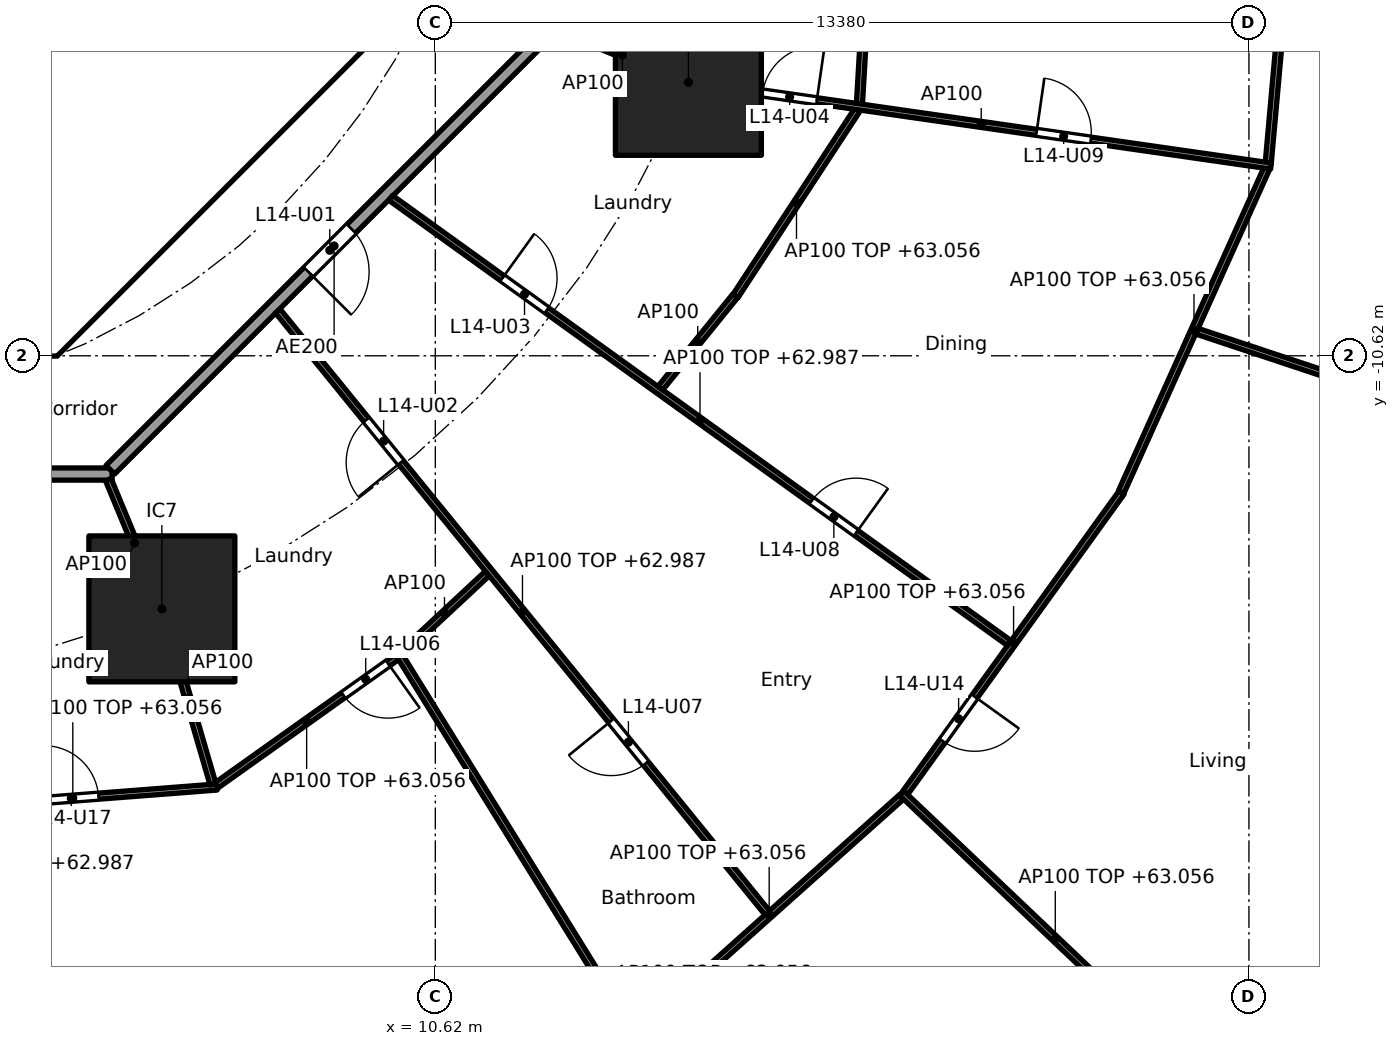
"""IFC4 building model, lengths in metres.
Left out: names, types, materials, properties, quantities, classifications, styles, units other than length and angle.
Written with IfcOpenShell. Run it as: python <this file> out.ifc"""

import sys

from ifc_helpers import new_model, si_unit, direction, frame, frame_2d, origin, origin_2d, place, context, subcontext, project, spatial, polyline, rectangle, outline, extrude, element, fill, save


model = new_model("IFC4")
c1 = context("Model", 3, precision=1e-05, world=origin(), true_north=direction((0.0, 1.0)))
c2 = subcontext(c1, "Body", "Model", "MODEL_VIEW")
j1 = project(units=[si_unit("LENGTHUNIT", "METRE"), si_unit("PLANEANGLEUNIT", "RADIAN")], contexts=[c1])
p1 = place(None, origin())
s1 = spatial("IfcSite", under=j1, at=p1, CompositionType="ELEMENT")
p2 = place(p1, origin())
s2 = spatial("IfcBuilding", under=s1, at=p2, CompositionType="ELEMENT")
p3 = place(p2, frame((0.0, 0.0, 60.3)))
s3 = spatial("IfcBuildingStorey", under=s2, at=p3, CompositionType="ELEMENT", Elevation=60.3)
for number, where, z_axis, x_axis in (
    (1, (6.123, -14.782, 0.0), (0.0, 0.0, 1.0), (1.0, 0.0, 0.0)),
    (2, (14.782, -6.123, 0.0), (0.0, 0.0, 1.0), (1.0, 0.0, 0.0)),
):
    element("IfcColumn", number, at=place(p3, frame(where, z_axis=z_axis, x_axis=x_axis)), inside=s3, PredefinedType="COLUMN", context=c2, shape_type="SweptSolid", body=[
        extrude(rectangle(XDim=2.4, YDim=2.4, at=origin_2d()), origin(), (0.0, 0.0, 1.0), 3.7),
    ])
p4 = place(p3, frame((4.613, -9.988, 0.0), z_axis=(0.0, 0.0, 1.0), x_axis=(0.707106781187, 0.707106781187, 0.0)))
e3 = element("IfcWall", 3, at=p4, inside=s3, PredefinedType="SHEAR", context=c2, shape_type="SweptSolid", body=[
    extrude(rectangle(XDim=7.602, YDim=0.6, at=frame_2d((3.801, 0.0))), origin(), (0.0, 0.0, 1.0), 3.44),
])
p5 = place(p4, frame((3.201, 0.0, 0.0)))
e4 = element("IfcOpeningElement", 4, at=p5, cuts=e3, PredefinedType="OPENING", context=c2, shape_type="SweptSolid", body=[
    extrude(rectangle(XDim=1.2, YDim=2.1, at=frame_2d((0.6, 1.05))), frame((0.0, 0.31, 0.0), z_axis=(0.0, -1.0, 0.0), x_axis=(1.0, 0.0, 0.0)), (0.0, 0.0, 1.0), 0.62),
])
p6 = place(p3, origin())
e5 = element("IfcWall", 5, at=p6, inside=s3, PredefinedType="SHEAR", context=c2, shape_type="SweptSolid", body=[
    extrude(outline(polyline([(-4.152, -10.025), (4.152, -10.025), (4.401, -9.776), (4.825, -10.2), (4.401, -10.625), (-4.401, -10.625), (-4.825, -10.2), (-4.401, -9.776), (-4.152, -10.025)])), origin(), (0.0, 0.0, 1.0), 3.44),
])
p7 = place(p3, frame((-5.104, -12.565, 0.0), z_axis=(0.0, 0.0, 1.0), x_axis=(1.0, 0.0, 0.0)))
e6 = element("IfcWall", 6, at=p7, inside=s3, PredefinedType="PARTITIONING", context=c2, shape_type="SweptSolid", body=[
    extrude(rectangle(XDim=10.409, YDim=0.2, at=frame_2d((5.205, 0.0))), origin(), (0.0, 0.0, 1.0), 3.44),
])
p8 = place(p3, frame((5.275, -12.494, 0.0), z_axis=(0.0, 0.0, 1.0), x_axis=(0.707106781187, 0.707106781187, 0.0)))
e7 = element("IfcWall", 7, at=p8, inside=s3, PredefinedType="PARTITIONING", context=c2, shape_type="SweptSolid", body=[
    extrude(rectangle(XDim=10.409, YDim=0.2, at=frame_2d((5.205, 0.0))), origin(), (0.0, 0.0, 1.0), 3.44),
])
p9 = place(p8, frame((4.604, 0.0, 0.0)))
e8 = element("IfcOpeningElement", 8, at=p9, cuts=e7, PredefinedType="OPENING", context=c2, shape_type="SweptSolid", body=[
    extrude(rectangle(XDim=1.0, YDim=2.1, at=frame_2d((0.5, 1.05))), frame((0.0, 0.11, 0.0), z_axis=(0.0, -1.0, 0.0), x_axis=(1.0, 0.0, 0.0)), (0.0, 0.0, 1.0), 0.22),
])
p10 = place(p3, frame((17.971, -0.05, 0.0), z_axis=(0.0, 0.0, 1.0), x_axis=(-0.058475267553, -0.998288857538, 0.0)))
e9 = element("IfcWall", 9, at=p10, inside=s3, PredefinedType="PARTITIONING", context=c2, shape_type="SweptSolid", body=[
    extrude(rectangle(XDim=6.438, YDim=0.1, at=frame_2d((3.219, 0.0))), origin(), (0.0, 0.0, 1.0), 2.756),
])
p11 = place(p3, frame((24.982, -0.05, 0.0), z_axis=(0.0, 0.0, 1.0), x_axis=(-0.089432471274, -0.995992888068, 0.0)))
e10 = element("IfcWall", 10, at=p11, inside=s3, PredefinedType="PARTITIONING", context=c2, shape_type="SweptSolid", body=[
    extrude(rectangle(XDim=7.423, YDim=0.1, at=frame_2d((3.711, 0.0))), origin(), (0.0, 0.0, 1.0), 2.756),
])
p12 = place(p3, frame((2.288, -18.078, 0.0), z_axis=(0.0, 0.0, 1.0), x_axis=(0.997016297228, 0.077191340583, 0.0)))
e11 = element("IfcWall", 11, at=p12, inside=s3, PredefinedType="PARTITIONING", context=c2, shape_type="SweptSolid", body=[
    extrude(rectangle(XDim=4.754, YDim=0.1, at=frame_2d((2.377, 0.0))), origin(), (0.0, 0.0, 1.0), 2.756),
])
p13 = place(p12, frame((1.902, 0.0, 0.0)))
e12 = element("IfcOpeningElement", 12, at=p13, cuts=e11, PredefinedType="OPENING", context=c2, shape_type="SweptSolid", body=[
    extrude(rectangle(XDim=0.9, YDim=2.1, at=frame_2d((0.45, 1.05))), frame((0.0, 0.06, 0.0), z_axis=(0.0, -1.0, 0.0), x_axis=(1.0, 0.0, 0.0)), (0.0, 0.0, 1.0), 0.12),
])
p14 = place(p3, frame((5.243, -12.657, 0.0), z_axis=(0.0, 0.0, 1.0), x_axis=(0.382719158442, -0.923864733477, 0.0)))
e13 = element("IfcWall", 13, at=p14, inside=s3, PredefinedType="PARTITIONING", context=c2, shape_type="SweptSolid", body=[
    extrude(rectangle(XDim=2.25, YDim=0.1, at=frame_2d((1.125, 0.0))), origin(), (0.0, 0.0, 1.0), 3.44),
])
p15 = place(p3, frame((6.137, -14.83, 0.0), z_axis=(0.0, 0.0, 1.0), x_axis=(0.279888967793, -0.960032377427, 0.0)))
e14 = element("IfcWall", 14, at=p15, inside=s3, PredefinedType="PARTITIONING", context=c2, shape_type="SweptSolid", body=[
    extrude(rectangle(XDim=2.955, YDim=0.1, at=frame_2d((1.478, 0.0))), origin(), (0.0, 0.0, 1.0), 3.44),
])
p16 = place(p3, frame((7.019, -17.686, 0.0), z_axis=(0.0, 0.0, 1.0), x_axis=(0.81494477814, 0.57953861699, 0.0)))
e15 = element("IfcWall", 15, at=p16, inside=s3, PredefinedType="PARTITIONING", context=c2, shape_type="SweptSolid", body=[
    extrude(rectangle(XDim=3.644, YDim=0.1, at=frame_2d((1.822, 0.0))), origin(), (0.0, 0.0, 1.0), 2.756),
])
p17 = place(p16, frame((2.564, 0.0, 0.0)))
e16 = element("IfcOpeningElement", 16, at=p17, cuts=e15, PredefinedType="OPENING", context=c2, shape_type="SweptSolid", body=[
    extrude(rectangle(XDim=0.9, YDim=2.1, at=frame_2d((0.45, 1.05))), frame((0.0, 0.06, 0.0), z_axis=(0.0, -1.0, 0.0), x_axis=(1.0, 0.0, 0.0)), (0.0, 0.0, 1.0), 0.12),
])
p18 = place(p3, frame((10.003, -15.503, 0.0), z_axis=(0.0, 0.0, 1.0), x_axis=(0.526446106164, -0.850208502254, 0.0)))
e17 = element("IfcWall", 17, at=p18, inside=s3, PredefinedType="PARTITIONING", context=c2, shape_type="SweptSolid", body=[
    extrude(rectangle(XDim=14.33, YDim=0.1, at=frame_2d((7.165, 0.0))), origin(), (0.0, 0.0, 1.0), 2.756),
])
p19 = place(p18, frame((10.415, 0.0, 0.0)))
e18 = element("IfcOpeningElement", 18, at=p19, cuts=e17, PredefinedType="OPENING", context=c2, shape_type="SweptSolid", body=[
    extrude(rectangle(XDim=0.9, YDim=2.1, at=frame_2d((0.45, 1.05))), frame((0.0, 0.06, 0.0), z_axis=(0.0, -1.0, 0.0), x_axis=(1.0, 0.0, 0.0)), (0.0, 0.0, 1.0), 0.12),
])
p20 = place(p3, frame((10.066, -15.511, 0.0), z_axis=(0.0, 0.0, 1.0), x_axis=(0.73201609945, 0.681287333029, 0.0)))
e19 = element("IfcWall", 19, at=p20, inside=s3, PredefinedType="PARTITIONING", context=c2, shape_type="SweptSolid", body=[
    extrude(rectangle(XDim=1.925, YDim=0.1, at=frame_2d((0.962, 0.0))), origin(), (0.0, 0.0, 1.0), 3.44),
])
p21 = place(p3, frame((13.936, -21.761, 0.0), z_axis=(0.0, 0.0, 1.0), x_axis=(0.745806142791, 0.666163041136, 0.0)))
e20 = element("IfcWall", 20, at=p21, inside=s3, PredefinedType="PARTITIONING", context=c2, shape_type="SweptSolid", body=[
    extrude(rectangle(XDim=5.831, YDim=0.1, at=frame_2d((2.915, 0.0))), origin(), (0.0, 0.0, 1.0), 2.756),
])
p22 = place(p3, frame((8.028, -9.882, 0.0), z_axis=(0.0, 0.0, 1.0), x_axis=(0.631035554955, -0.77575390968, 0.0)))
e21 = element("IfcWall", 21, at=p22, inside=s3, PredefinedType="PARTITIONING", context=c2, shape_type="SweptSolid", body=[
    extrude(rectangle(XDim=12.759, YDim=0.1, at=frame_2d((6.379, 0.0))), origin(), (0.0, 0.0, 1.0), 2.687),
])
p23 = place(p22, frame((2.311, 0.0, 0.0)))
e22 = element("IfcOpeningElement", 22, at=p23, cuts=e21, PredefinedType="OPENING", context=c2, shape_type="SweptSolid", body=[
    extrude(rectangle(XDim=0.9, YDim=2.1, at=frame_2d((0.45, 1.05))), frame((0.0, 0.06, 0.0), z_axis=(0.0, -1.0, 0.0), x_axis=(1.0, 0.0, 0.0)), (0.0, 0.0, 1.0), 0.12),
])
p24 = place(p22, frame((8.69, 0.0, 0.0)))
e23 = element("IfcOpeningElement", 23, at=p24, cuts=e21, PredefinedType="OPENING", context=c2, shape_type="SweptSolid", body=[
    extrude(rectangle(XDim=0.9, YDim=2.1, at=frame_2d((0.45, 1.05))), frame((0.0, 0.06, 0.0), z_axis=(0.0, -1.0, 0.0), x_axis=(1.0, 0.0, 0.0)), (0.0, 0.0, 1.0), 0.12),
])
p25 = place(p3, frame((18.286, -17.809, 0.0), z_axis=(0.0, 0.0, 1.0), x_axis=(0.725242309581, -0.688493712676, 0.0)))
e24 = element("IfcWall", 24, at=p25, inside=s3, PredefinedType="PARTITIONING", context=c2, shape_type="SweptSolid", body=[
    extrude(rectangle(XDim=6.976, YDim=0.1, at=frame_2d((3.488, 0.0))), origin(), (0.0, 0.0, 1.0), 2.756),
])
p26 = place(p3, frame((18.351, -17.803, 0.0), z_axis=(0.0, 0.0, 1.0), x_axis=(0.584558392935, 0.811351640936, 0.0)))
e25 = element("IfcWall", 25, at=p26, inside=s3, PredefinedType="PARTITIONING", context=c2, shape_type="SweptSolid", body=[
    extrude(rectangle(XDim=6.084, YDim=0.1, at=frame_2d((3.042, 0.0))), origin(), (0.0, 0.0, 1.0), 2.756),
])
p27 = place(p26, frame((1.046, 0.0, 0.0)))
e26 = element("IfcOpeningElement", 26, at=p27, cuts=e25, PredefinedType="OPENING", context=c2, shape_type="SweptSolid", body=[
    extrude(rectangle(XDim=0.9, YDim=2.1, at=frame_2d((0.45, 1.05))), frame((0.0, 0.06, 0.0), z_axis=(0.0, -1.0, 0.0), x_axis=(1.0, 0.0, 0.0)), (0.0, 0.0, 1.0), 0.12),
])
p28 = place(p3, frame((9.886, -8.023, 0.0), z_axis=(0.0, 0.0, 1.0), x_axis=(0.811615973871, -0.58419133078, 0.0)))
e27 = element("IfcWall", 27, at=p28, inside=s3, PredefinedType="PARTITIONING", context=c2, shape_type="SweptSolid", body=[
    extrude(rectangle(XDim=12.535, YDim=0.1, at=frame_2d((6.268, 0.0))), origin(), (0.0, 0.0, 1.0), 2.687),
])
p29 = place(p28, frame((2.262, 0.0, 0.0)))
e28 = element("IfcOpeningElement", 28, at=p29, cuts=e27, PredefinedType="OPENING", context=c2, shape_type="SweptSolid", body=[
    extrude(rectangle(XDim=0.9, YDim=2.1, at=frame_2d((0.45, 1.05))), frame((0.0, 0.06, 0.0), z_axis=(0.0, -1.0, 0.0), x_axis=(1.0, 0.0, 0.0)), (0.0, 0.0, 1.0), 0.12),
])
p30 = place(p28, frame((8.53, 0.0, 0.0)))
e29 = element("IfcOpeningElement", 29, at=p30, cuts=e27, PredefinedType="OPENING", context=c2, shape_type="SweptSolid", body=[
    extrude(rectangle(XDim=0.9, YDim=2.1, at=frame_2d((0.45, 1.05))), frame((0.0, 0.06, 0.0), z_axis=(0.0, -1.0, 0.0), x_axis=(1.0, 0.0, 0.0)), (0.0, 0.0, 1.0), 0.12),
])
p31 = place(p3, frame((14.32, -11.153, 0.0), z_axis=(0.0, 0.0, 1.0), x_axis=(0.63006076661, 0.776545832761, 0.0)))
e30 = element("IfcWall", 30, at=p31, inside=s3, PredefinedType="PARTITIONING", context=c2, shape_type="SweptSolid", body=[
    extrude(rectangle(XDim=1.953, YDim=0.1, at=frame_2d((0.977, 0.0))), origin(), (0.0, 0.0, 1.0), 3.44),
])
p32 = place(p3, frame((15.555, -9.639, 0.0), z_axis=(0.0, 0.0, 1.0), x_axis=(0.547618530423, 0.836728119007, 0.0)))
e31 = element("IfcWall", 31, at=p32, inside=s3, PredefinedType="PARTITIONING", context=c2, shape_type="SweptSolid", body=[
    extrude(rectangle(XDim=3.67, YDim=0.1, at=frame_2d((1.835, 0.0))), origin(), (0.0, 0.0, 1.0), 2.756),
])
p33 = place(p3, frame((21.899, -12.861, 0.0), z_axis=(0.0, 0.0, 1.0), x_axis=(0.410197710154, 0.911996622025, 0.0)))
e32 = element("IfcWall", 32, at=p33, inside=s3, PredefinedType="PARTITIONING", context=c2, shape_type="SweptSolid", body=[
    extrude(rectangle(XDim=5.837, YDim=0.1, at=frame_2d((2.918, 0.0))), origin(), (0.0, 0.0, 1.0), 2.756),
])
p34 = place(p3, frame((23.144, -10.216, 0.0), z_axis=(0.0, 0.0, 1.0), x_axis=(0.948811715359, -0.315842253027, 0.0)))
e33 = element("IfcWall", 33, at=p34, inside=s3, PredefinedType="PARTITIONING", context=c2, shape_type="SweptSolid", body=[
    extrude(rectangle(XDim=7.6, YDim=0.1, at=frame_2d((3.8, 0.0))), origin(), (0.0, 0.0, 1.0), 2.837),
])
p35 = place(p34, frame((3.35, 0.0, 0.0)))
e34 = element("IfcOpeningElement", 34, at=p35, cuts=e33, PredefinedType="OPENING", context=c2, shape_type="SweptSolid", body=[
    extrude(rectangle(XDim=0.9, YDim=2.1, at=frame_2d((0.45, 1.05))), frame((0.0, 0.06, 0.0), z_axis=(0.0, -1.0, 0.0), x_axis=(1.0, 0.0, 0.0)), (0.0, 0.0, 1.0), 0.12),
])
p36 = place(p3, frame((12.657, -5.243, 0.0), z_axis=(0.0, 0.0, 1.0), x_axis=(0.923864733477, -0.382719158442, 0.0)))
e35 = element("IfcWall", 35, at=p36, inside=s3, PredefinedType="PARTITIONING", context=c2, shape_type="SweptSolid", body=[
    extrude(rectangle(XDim=2.25, YDim=0.1, at=frame_2d((1.125, 0.0))), origin(), (0.0, 0.0, 1.0), 3.44),
])
p37 = place(p3, frame((14.832, -6.13, 0.0), z_axis=(0.0, 0.0, 1.0), x_axis=(0.989837122016, -0.142205737856, 0.0)))
e36 = element("IfcWall", 36, at=p37, inside=s3, PredefinedType="PARTITIONING", context=c2, shape_type="SweptSolid", body=[
    extrude(rectangle(XDim=9.63, YDim=0.1, at=frame_2d((4.815, 0.0))), origin(), (0.0, 0.0, 1.0), 3.44),
])
p38 = place(p37, frame((1.182, 0.0, 0.0)))
e37 = element("IfcOpeningElement", 37, at=p38, cuts=e36, PredefinedType="OPENING", context=c2, shape_type="SweptSolid", body=[
    extrude(rectangle(XDim=0.9, YDim=2.1, at=frame_2d((0.45, 1.05))), frame((0.0, 0.06, 0.0), z_axis=(0.0, -1.0, 0.0), x_axis=(1.0, 0.0, 0.0)), (0.0, 0.0, 1.0), 0.12),
])
p39 = place(p37, frame((5.734, 0.0, 0.0)))
e38 = element("IfcOpeningElement", 38, at=p39, cuts=e36, PredefinedType="OPENING", context=c2, shape_type="SweptSolid", body=[
    extrude(rectangle(XDim=0.9, YDim=2.1, at=frame_2d((0.45, 1.05))), frame((0.0, 0.06, 0.0), z_axis=(0.0, -1.0, 0.0), x_axis=(1.0, 0.0, 0.0)), (0.0, 0.0, 1.0), 0.12),
])
p40 = place(p5, origin())
e39 = element("IfcDoor", 39, at=p40, inside=s3, OperationType="SINGLE_SWING_RIGHT", PredefinedType="DOOR", context=c2, shape_type="SweptSolid", body=[
    extrude(rectangle(XDim=1.2, YDim=2.1, at=frame_2d((0.6, 1.05))), frame((0.0, 0.025, 0.0), z_axis=(0.0, -1.0, 0.0), x_axis=(1.0, 0.0, 0.0)), (0.0, 0.0, 1.0), 0.05),
])
fill(e4, e39)
p41 = place(p9, frame((1.0, 0.0, 0.0), x_axis=(-1.0, 0.0, 0.0)))
e40 = element("IfcDoor", 40, at=p41, inside=s3, OperationType="SINGLE_SWING_RIGHT", PredefinedType="DOOR", context=c2, shape_type="SweptSolid", body=[
    extrude(rectangle(XDim=1.0, YDim=2.1, at=frame_2d((0.5, 1.05))), frame((0.0, 0.025, 0.0), z_axis=(0.0, -1.0, 0.0), x_axis=(1.0, 0.0, 0.0)), (0.0, 0.0, 1.0), 0.05),
])
fill(e8, e40)
p42 = place(p23, frame((0.9, 0.0, 0.0), x_axis=(-1.0, 0.0, 0.0)))
e41 = element("IfcDoor", 41, at=p42, inside=s3, OperationType="SINGLE_SWING_LEFT", PredefinedType="DOOR", context=c2, shape_type="SweptSolid", body=[
    extrude(rectangle(XDim=0.9, YDim=2.1, at=frame_2d((0.45, 1.05))), frame((0.0, 0.025, 0.0), z_axis=(0.0, -1.0, 0.0), x_axis=(1.0, 0.0, 0.0)), (0.0, 0.0, 1.0), 0.05),
])
fill(e22, e41)
p43 = place(p29, origin())
e42 = element("IfcDoor", 42, at=p43, inside=s3, OperationType="SINGLE_SWING_LEFT", PredefinedType="DOOR", context=c2, shape_type="SweptSolid", body=[
    extrude(rectangle(XDim=0.9, YDim=2.1, at=frame_2d((0.45, 1.05))), frame((0.0, 0.025, 0.0), z_axis=(0.0, -1.0, 0.0), x_axis=(1.0, 0.0, 0.0)), (0.0, 0.0, 1.0), 0.05),
])
fill(e28, e42)
p44 = place(p38, origin())
e43 = element("IfcDoor", 43, at=p44, inside=s3, OperationType="SINGLE_SWING_RIGHT", PredefinedType="DOOR", context=c2, shape_type="SweptSolid", body=[
    extrude(rectangle(XDim=0.9, YDim=2.1, at=frame_2d((0.45, 1.05))), frame((0.0, 0.025, 0.0), z_axis=(0.0, -1.0, 0.0), x_axis=(1.0, 0.0, 0.0)), (0.0, 0.0, 1.0), 0.05),
])
fill(e37, e43)
p45 = place(p17, frame((0.9, 0.0, 0.0), x_axis=(-1.0, 0.0, 0.0)))
e44 = element("IfcDoor", 44, at=p45, inside=s3, OperationType="SINGLE_SWING_LEFT", PredefinedType="DOOR", context=c2, shape_type="SweptSolid", body=[
    extrude(rectangle(XDim=0.9, YDim=2.1, at=frame_2d((0.45, 1.05))), frame((0.0, 0.025, 0.0), z_axis=(0.0, -1.0, 0.0), x_axis=(1.0, 0.0, 0.0)), (0.0, 0.0, 1.0), 0.05),
])
fill(e16, e44)
p46 = place(p24, frame((0.9, 0.0, 0.0), x_axis=(-1.0, 0.0, 0.0)))
e45 = element("IfcDoor", 45, at=p46, inside=s3, OperationType="SINGLE_SWING_RIGHT", PredefinedType="DOOR", context=c2, shape_type="SweptSolid", body=[
    extrude(rectangle(XDim=0.9, YDim=2.1, at=frame_2d((0.45, 1.05))), frame((0.0, 0.025, 0.0), z_axis=(0.0, -1.0, 0.0), x_axis=(1.0, 0.0, 0.0)), (0.0, 0.0, 1.0), 0.05),
])
fill(e23, e45)
p47 = place(p30, origin())
e46 = element("IfcDoor", 46, at=p47, inside=s3, OperationType="SINGLE_SWING_RIGHT", PredefinedType="DOOR", context=c2, shape_type="SweptSolid", body=[
    extrude(rectangle(XDim=0.9, YDim=2.1, at=frame_2d((0.45, 1.05))), frame((0.0, 0.025, 0.0), z_axis=(0.0, -1.0, 0.0), x_axis=(1.0, 0.0, 0.0)), (0.0, 0.0, 1.0), 0.05),
])
fill(e29, e46)
p48 = place(p39, origin())
e47 = element("IfcDoor", 47, at=p48, inside=s3, OperationType="SINGLE_SWING_LEFT", PredefinedType="DOOR", context=c2, shape_type="SweptSolid", body=[
    extrude(rectangle(XDim=0.9, YDim=2.1, at=frame_2d((0.45, 1.05))), frame((0.0, 0.025, 0.0), z_axis=(0.0, -1.0, 0.0), x_axis=(1.0, 0.0, 0.0)), (0.0, 0.0, 1.0), 0.05),
])
fill(e38, e47)
p49 = place(p27, frame((0.9, 0.0, 0.0), x_axis=(-1.0, 0.0, 0.0)))
e48 = element("IfcDoor", 48, at=p49, inside=s3, OperationType="SINGLE_SWING_LEFT", PredefinedType="DOOR", context=c2, shape_type="SweptSolid", body=[
    extrude(rectangle(XDim=0.9, YDim=2.1, at=frame_2d((0.45, 1.05))), frame((0.0, 0.025, 0.0), z_axis=(0.0, -1.0, 0.0), x_axis=(1.0, 0.0, 0.0)), (0.0, 0.0, 1.0), 0.05),
])
fill(e26, e48)
p50 = place(p13, origin())
e49 = element("IfcDoor", 49, at=p50, inside=s3, OperationType="SINGLE_SWING_LEFT", PredefinedType="DOOR", context=c2, shape_type="SweptSolid", body=[
    extrude(rectangle(XDim=0.9, YDim=2.1, at=frame_2d((0.45, 1.05))), frame((0.0, 0.025, 0.0), z_axis=(0.0, -1.0, 0.0), x_axis=(1.0, 0.0, 0.0)), (0.0, 0.0, 1.0), 0.05),
])
fill(e12, e49)
save(model, sys.argv[1])
